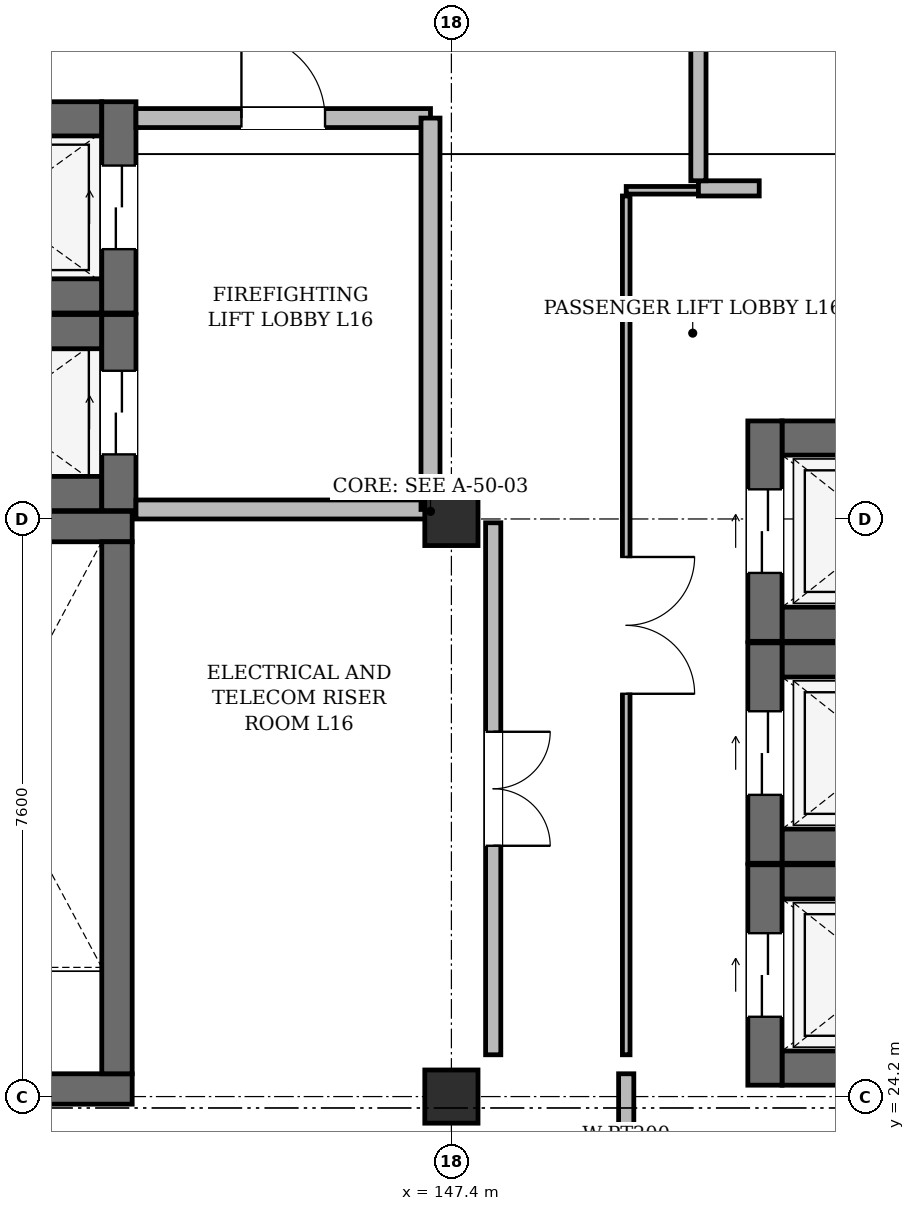
"""IFC4 building model, lengths in metres.
Left out: names, types, materials, properties, quantities, classifications, styles, units other than length and angle.
Written with IfcOpenShell. Run it as: python <this file> out.ifc"""

import sys

from ifc_helpers import new_model, si_unit, direction, frame, frame_2d, origin, origin_2d, place, context, subcontext, project, spatial, rectangle, extrude, element, fill, save


model = new_model("IFC4")
c1 = context("Model", 3, precision=1e-05, world=origin(), true_north=direction((0.0, 1.0)))
c2 = subcontext(c1, "Body", "Model", "MODEL_VIEW")
j1 = project(units=[si_unit("LENGTHUNIT", "METRE"), si_unit("PLANEANGLEUNIT", "RADIAN")], contexts=[c1])
p1 = place(None, origin())
s1 = spatial("IfcSite", under=j1, at=p1, CompositionType="ELEMENT")
p2 = place(p1, origin())
s2 = spatial("IfcBuilding", under=s1, at=p2, CompositionType="ELEMENT")
p3 = place(p2, frame((0.0, 0.0, 70.2)))
s3 = spatial("IfcBuildingStorey", under=s2, at=p3, CompositionType="ELEMENT", Elevation=70.2)
for number, where, z_axis, x_axis in (
    (1, (147.4, 24.2, 0.0), (0.0, 0.0, 1.0), (1.0, 0.0, 0.0)),
    (2, (147.4, 31.8, 0.0), (0.0, 0.0, 1.0), (1.0, 0.0, 0.0)),
):
    element("IfcColumn", number, at=place(p3, frame(where, z_axis=z_axis, x_axis=x_axis)), inside=s3, PredefinedType="COLUMN", context=c2, shape_type="SweptSolid", body=[
        extrude(rectangle(XDim=0.7, YDim=0.7, at=origin_2d()), origin(), (0.0, 0.0, 1.0), 3.67),
    ])
p4 = place(p3, frame((139.4, 24.3, 0.0), z_axis=(0.0, 0.0, 1.0), x_axis=(1.0, 0.0, 0.0)))
e3 = element("IfcWall", 3, at=p4, inside=s3, PredefinedType="SHEAR", context=c2, shape_type="SweptSolid", body=[
    extrude(rectangle(XDim=3.8, YDim=0.4, at=frame_2d((1.9, 0.0))), origin(), (0.0, 0.0, 1.0), 3.67),
])
p5 = place(p4, frame((1.3, 0.0, 0.0)))
e4 = element("IfcOpeningElement", 4, at=p5, cuts=e3, PredefinedType="OPENING", context=c2, shape_type="SweptSolid", body=[
    extrude(rectangle(XDim=1.2, YDim=2.2, at=frame_2d((0.6, 1.1))), frame((0.0, 0.212, 0.0), z_axis=(0.0, -1.0, 0.0), x_axis=(1.0, 0.0, 0.0)), (0.0, 0.0, 1.0), 0.424),
])
p6 = place(p3, frame((139.4, 31.7, 0.0), z_axis=(0.0, 0.0, 1.0), x_axis=(1.0, 0.0, 0.0)))
e5 = element("IfcWall", 5, at=p6, inside=s3, PredefinedType="SHEAR", context=c2, shape_type="SweptSolid", body=[
    extrude(rectangle(XDim=3.8, YDim=0.4, at=frame_2d((1.9, 0.0))), origin(), (0.0, 0.0, 1.0), 3.67),
])
p7 = place(p3, frame((143.0, 24.5, 0.0), z_axis=(0.0, 0.0, 1.0), x_axis=(0.0, 1.0, 0.0)))
e6 = element("IfcWall", 6, at=p7, inside=s3, PredefinedType="SHEAR", context=c2, shape_type="SweptSolid", body=[
    extrude(rectangle(XDim=7.0, YDim=0.4, at=frame_2d((3.5, 0.0))), origin(), (0.0, 0.0, 1.0), 3.67),
])
for number, where, z_axis, x_axis in (
    (7, (140.06, 32.135, 0.0), (0.0, 0.0, 1.0), (1.0, 0.0, 0.0)),
    (8, (140.06, 34.265, 0.0), (0.0, 0.0, 1.0), (1.0, 0.0, 0.0)),
):
    element("IfcWall", number, at=place(p3, frame(where, z_axis=z_axis, x_axis=x_axis)), inside=s3, PredefinedType="SHEAR", context=c2, shape_type="SweptSolid", body=[
        extrude(rectangle(XDim=2.74, YDim=0.45, at=frame_2d((1.37, 0.0))), origin(), (0.0, 0.0, 1.0), 3.67),
    ])
p8 = place(p3, frame((143.025, 31.91, 0.0), z_axis=(0.0, 0.0, 1.0), x_axis=(0.0, 1.0, 0.0)))
e9 = element("IfcWall", 9, at=p8, inside=s3, PredefinedType="SHEAR", context=c2, shape_type="SweptSolid", body=[
    extrude(rectangle(XDim=2.58, YDim=0.45, at=frame_2d((1.29, 0.0))), origin(), (0.0, 0.0, 1.0), 3.67),
])
p9 = place(p8, frame((0.74, 0.0, 0.0)))
e10 = element("IfcOpeningElement", 10, at=p9, cuts=e9, PredefinedType="OPENING", context=c2, shape_type="SweptSolid", body=[
    extrude(rectangle(XDim=1.1, YDim=2.2, at=frame_2d((0.55, 1.1))), frame((0.0, 0.237, 0.0), z_axis=(0.0, -1.0, 0.0), x_axis=(1.0, 0.0, 0.0)), (0.0, 0.0, 1.0), 0.474),
])
for number, where, z_axis, x_axis in (
    (11, (140.06, 34.735, 0.0), (0.0, 0.0, 1.0), (1.0, 0.0, 0.0)),
    (12, (140.06, 37.065, 0.0), (0.0, 0.0, 1.0), (1.0, 0.0, 0.0)),
):
    element("IfcWall", number, at=place(p3, frame(where, z_axis=z_axis, x_axis=x_axis)), inside=s3, PredefinedType="SHEAR", context=c2, shape_type="SweptSolid", body=[
        extrude(rectangle(XDim=2.74, YDim=0.45, at=frame_2d((1.37, 0.0))), origin(), (0.0, 0.0, 1.0), 3.67),
    ])
p10 = place(p3, frame((143.025, 34.51, 0.0), z_axis=(0.0, 0.0, 1.0), x_axis=(0.0, 1.0, 0.0)))
e13 = element("IfcWall", 13, at=p10, inside=s3, PredefinedType="SHEAR", context=c2, shape_type="SweptSolid", body=[
    extrude(rectangle(XDim=2.78, YDim=0.45, at=frame_2d((1.39, 0.0))), origin(), (0.0, 0.0, 1.0), 3.67),
])
p11 = place(p10, frame((0.84, 0.0, 0.0)))
e14 = element("IfcOpeningElement", 14, at=p11, cuts=e13, PredefinedType="OPENING", context=c2, shape_type="SweptSolid", body=[
    extrude(rectangle(XDim=1.1, YDim=2.2, at=frame_2d((0.55, 1.1))), frame((0.0, 0.237, 0.0), z_axis=(0.0, -1.0, 0.0), x_axis=(1.0, 0.0, 0.0)), (0.0, 0.0, 1.0), 0.474),
])
for number, where, z_axis, x_axis in (
    (15, (151.75, 24.575, 0.0), (0.0, 0.0, 1.0), (1.0, 0.0, 0.0)),
    (16, (151.75, 27.025, 0.0), (0.0, 0.0, 1.0), (1.0, 0.0, 0.0)),
):
    element("IfcWall", number, at=place(p3, frame(where, z_axis=z_axis, x_axis=x_axis)), inside=s3, PredefinedType="SHEAR", context=c2, shape_type="SweptSolid", body=[
        extrude(rectangle(XDim=2.7, YDim=0.45, at=frame_2d((1.35, 0.0))), origin(), (0.0, 0.0, 1.0), 3.67),
    ])
p12 = place(p3, frame((151.525, 24.35, 0.0), z_axis=(0.0, 0.0, 1.0), x_axis=(0.0, 1.0, 0.0)))
e17 = element("IfcWall", 17, at=p12, inside=s3, PredefinedType="SHEAR", context=c2, shape_type="SweptSolid", body=[
    extrude(rectangle(XDim=2.9, YDim=0.45, at=frame_2d((1.45, 0.0))), origin(), (0.0, 0.0, 1.0), 3.67),
])
p13 = place(p12, frame((0.9, 0.0, 0.0)))
e18 = element("IfcOpeningElement", 18, at=p13, cuts=e17, PredefinedType="OPENING", context=c2, shape_type="SweptSolid", body=[
    extrude(rectangle(XDim=1.1, YDim=2.2, at=frame_2d((0.55, 1.1))), frame((0.0, 0.237, 0.0), z_axis=(0.0, -1.0, 0.0), x_axis=(1.0, 0.0, 0.0)), (0.0, 0.0, 1.0), 0.474),
])
for number, where, z_axis, x_axis in (
    (19, (151.75, 27.495, 0.0), (0.0, 0.0, 1.0), (1.0, 0.0, 0.0)),
    (20, (151.75, 29.945, 0.0), (0.0, 0.0, 1.0), (1.0, 0.0, 0.0)),
):
    element("IfcWall", number, at=place(p3, frame(where, z_axis=z_axis, x_axis=x_axis)), inside=s3, PredefinedType="SHEAR", context=c2, shape_type="SweptSolid", body=[
        extrude(rectangle(XDim=2.7, YDim=0.45, at=frame_2d((1.35, 0.0))), origin(), (0.0, 0.0, 1.0), 3.67),
    ])
p14 = place(p3, frame((151.525, 27.27, 0.0), z_axis=(0.0, 0.0, 1.0), x_axis=(0.0, 1.0, 0.0)))
e21 = element("IfcWall", 21, at=p14, inside=s3, PredefinedType="SHEAR", context=c2, shape_type="SweptSolid", body=[
    extrude(rectangle(XDim=2.9, YDim=0.45, at=frame_2d((1.45, 0.0))), origin(), (0.0, 0.0, 1.0), 3.67),
])
p15 = place(p14, frame((0.9, 0.0, 0.0)))
e22 = element("IfcOpeningElement", 22, at=p15, cuts=e21, PredefinedType="OPENING", context=c2, shape_type="SweptSolid", body=[
    extrude(rectangle(XDim=1.1, YDim=2.2, at=frame_2d((0.55, 1.1))), frame((0.0, 0.237, 0.0), z_axis=(0.0, -1.0, 0.0), x_axis=(1.0, 0.0, 0.0)), (0.0, 0.0, 1.0), 0.474),
])
for number, where, z_axis, x_axis in (
    (23, (151.75, 30.415, 0.0), (0.0, 0.0, 1.0), (1.0, 0.0, 0.0)),
    (24, (151.75, 32.865, 0.0), (0.0, 0.0, 1.0), (1.0, 0.0, 0.0)),
):
    element("IfcWall", number, at=place(p3, frame(where, z_axis=z_axis, x_axis=x_axis)), inside=s3, PredefinedType="SHEAR", context=c2, shape_type="SweptSolid", body=[
        extrude(rectangle(XDim=2.7, YDim=0.45, at=frame_2d((1.35, 0.0))), origin(), (0.0, 0.0, 1.0), 3.67),
    ])
p16 = place(p3, frame((151.525, 30.19, 0.0), z_axis=(0.0, 0.0, 1.0), x_axis=(0.0, 1.0, 0.0)))
e25 = element("IfcWall", 25, at=p16, inside=s3, PredefinedType="SHEAR", context=c2, shape_type="SweptSolid", body=[
    extrude(rectangle(XDim=2.9, YDim=0.45, at=frame_2d((1.45, 0.0))), origin(), (0.0, 0.0, 1.0), 3.67),
])
p17 = place(p16, frame((0.9, 0.0, 0.0)))
e26 = element("IfcOpeningElement", 26, at=p17, cuts=e25, PredefinedType="OPENING", context=c2, shape_type="SweptSolid", body=[
    extrude(rectangle(XDim=1.1, YDim=2.2, at=frame_2d((0.55, 1.1))), frame((0.0, 0.237, 0.0), z_axis=(0.0, -1.0, 0.0), x_axis=(1.0, 0.0, 0.0)), (0.0, 0.0, 1.0), 0.474),
])
p18 = place(p3, frame((143.25, 37.075, 0.0), z_axis=(0.0, 0.0, 1.0), x_axis=(1.0, 0.0, 0.0)))
e27 = element("IfcWall", 27, at=p18, inside=s3, PredefinedType="SOLIDWALL", context=c2, shape_type="SweptSolid", body=[
    extrude(rectangle(XDim=3.875, YDim=0.25, at=frame_2d((1.938, 0.0))), origin(), (0.0, 0.0, 1.0), 3.605),
])
p19 = place(p18, frame((1.387, 0.0, 0.0)))
e28 = element("IfcOpeningElement", 28, at=p19, cuts=e27, PredefinedType="OPENING", context=c2, shape_type="SweptSolid", body=[
    extrude(rectangle(XDim=1.1, YDim=2.2, at=frame_2d((0.55, 1.1))), frame((0.0, 0.137, 0.0), z_axis=(0.0, -1.0, 0.0), x_axis=(1.0, 0.0, 0.0)), (0.0, 0.0, 1.0), 0.274),
])
p20 = place(p3, frame((143.25, 31.925, 0.0), z_axis=(0.0, 0.0, 1.0), x_axis=(1.0, 0.0, 0.0)))
e29 = element("IfcWall", 29, at=p20, inside=s3, PredefinedType="SOLIDWALL", context=c2, shape_type="SweptSolid", body=[
    extrude(rectangle(XDim=3.875, YDim=0.25, at=frame_2d((1.938, 0.0))), origin(), (0.0, 0.0, 1.0), 3.005),
])
p21 = place(p3, frame((147.125, 31.925, 0.0), z_axis=(0.0, 0.0, 1.0), x_axis=(0.0, 1.0, 0.0)))
e30 = element("IfcWall", 30, at=p21, inside=s3, PredefinedType="SOLIDWALL", context=c2, shape_type="SweptSolid", body=[
    extrude(rectangle(XDim=5.15, YDim=0.25, at=frame_2d((2.575, 0.0))), origin(), (0.0, 0.0, 1.0), 3.005),
])
p22 = place(p3, frame((147.95, 31.75, 0.0), z_axis=(0.0, 0.0, 1.0), x_axis=(0.0, -1.0, 0.0)))
e31 = element("IfcWall", 31, at=p22, inside=s3, PredefinedType="PARTITIONING", context=c2, shape_type="SweptSolid", body=[
    extrude(rectangle(XDim=7.0, YDim=0.2, at=frame_2d((3.5, 0.0))), origin(), (0.0, 0.0, 1.0), 3.605),
])
p23 = place(p22, frame((2.75, 0.0, 0.0)))
e32 = element("IfcOpeningElement", 32, at=p23, cuts=e31, PredefinedType="OPENING", context=c2, shape_type="SweptSolid", body=[
    extrude(rectangle(XDim=1.5, YDim=2.2, at=frame_2d((0.75, 1.1))), frame((0.0, 0.112, 0.0), z_axis=(0.0, -1.0, 0.0), x_axis=(1.0, 0.0, 0.0)), (0.0, 0.0, 1.0), 0.224),
])
p24 = place(p3, frame((149.7, 24.75, 0.0), z_axis=(0.0, 0.0, 1.0), x_axis=(0.0, 1.0, 0.0)))
e33 = element("IfcWall", 33, at=p24, inside=s3, PredefinedType="PARTITIONING", context=c2, shape_type="SweptSolid", body=[
    extrude(rectangle(XDim=11.3, YDim=0.1, at=frame_2d((5.65, 0.0))), origin(), (0.0, 0.0, 1.0), 3.605),
])
p25 = place(p24, frame((4.75, 0.0, 0.0)))
e34 = element("IfcOpeningElement", 34, at=p25, cuts=e33, PredefinedType="OPENING", context=c2, shape_type="SweptSolid", body=[
    extrude(rectangle(XDim=1.8, YDim=2.4, at=frame_2d((0.9, 1.2))), frame((0.0, 0.062, 0.0), z_axis=(0.0, -1.0, 0.0), x_axis=(1.0, 0.0, 0.0)), (0.0, 0.0, 1.0), 0.124),
])
p26 = place(p3, frame((149.7, 36.125, 0.0), z_axis=(0.0, 0.0, 1.0), x_axis=(1.0, 0.0, 0.0)))
e35 = element("IfcWall", 35, at=p26, inside=s3, PredefinedType="PARTITIONING", context=c2, shape_type="SweptSolid", body=[
    extrude(rectangle(XDim=0.95, YDim=0.1, at=frame_2d((0.475, 0.0))), origin(), (0.0, 0.0, 1.0), 3.605),
])
for number, where, z_axis, x_axis in (
    (36, (150.65, 36.15, 0.0), (0.0, 0.0, 1.0), (1.0, 0.0, 0.0)),
    (37, (149.7, 24.5, 0.0), (0.0, 0.0, 1.0), (0.0, -1.0, 0.0)),
):
    element("IfcWall", number, at=place(p3, frame(where, z_axis=z_axis, x_axis=x_axis)), inside=s3, PredefinedType="PARTITIONING", context=c2, shape_type="SweptSolid", body=[
        extrude(rectangle(XDim=0.8, YDim=0.2, at=frame_2d((0.4, 0.0))), origin(), (0.0, 0.0, 1.0), 3.605),
    ])
p27 = place(p3, frame((150.65, 47.0, 0.0), z_axis=(0.0, 0.0, 1.0), x_axis=(0.0, -1.0, 0.0)))
e38 = element("IfcWall", 38, at=p27, inside=s3, PredefinedType="PARTITIONING", context=c2, shape_type="SweptSolid", body=[
    extrude(rectangle(XDim=10.75, YDim=0.2, at=frame_2d((5.375, 0.0))), origin(), (0.0, 0.0, 1.0), 3.605),
])
p28 = place(p27, frame((4.625, 0.0, 0.0)))
e39 = element("IfcOpeningElement", 39, at=p28, cuts=e38, PredefinedType="OPENING", context=c2, shape_type="SweptSolid", body=[
    extrude(rectangle(XDim=1.5, YDim=2.2, at=frame_2d((0.75, 1.1))), frame((0.0, 0.112, 0.0), z_axis=(0.0, -1.0, 0.0), x_axis=(1.0, 0.0, 0.0)), (0.0, 0.0, 1.0), 0.224),
])
p29 = place(p9, origin())
e40 = element("IfcDoor", 40, at=p29, inside=s3, OperationType="DOUBLE_DOOR_SLIDING", PredefinedType="DOOR", context=c2, shape_type="SweptSolid", body=[
    extrude(rectangle(XDim=1.1, YDim=2.2, at=frame_2d((0.55, 1.1))), frame((0.0, 0.025, 0.0), z_axis=(0.0, -1.0, 0.0), x_axis=(1.0, 0.0, 0.0)), (0.0, 0.0, 1.0), 0.05),
])
fill(e10, e40)
p30 = place(p11, origin())
e41 = element("IfcDoor", 41, at=p30, inside=s3, OperationType="DOUBLE_DOOR_SLIDING", PredefinedType="DOOR", context=c2, shape_type="SweptSolid", body=[
    extrude(rectangle(XDim=1.1, YDim=2.2, at=frame_2d((0.55, 1.1))), frame((0.0, 0.025, 0.0), z_axis=(0.0, -1.0, 0.0), x_axis=(1.0, 0.0, 0.0)), (0.0, 0.0, 1.0), 0.05),
])
fill(e14, e41)
p31 = place(p13, origin())
e42 = element("IfcDoor", 42, at=p31, inside=s3, OperationType="DOUBLE_DOOR_SLIDING", PredefinedType="DOOR", context=c2, shape_type="SweptSolid", body=[
    extrude(rectangle(XDim=1.1, YDim=2.2, at=frame_2d((0.55, 1.1))), frame((0.0, 0.025, 0.0), z_axis=(0.0, -1.0, 0.0), x_axis=(1.0, 0.0, 0.0)), (0.0, 0.0, 1.0), 0.05),
])
fill(e18, e42)
p32 = place(p15, origin())
e43 = element("IfcDoor", 43, at=p32, inside=s3, OperationType="DOUBLE_DOOR_SLIDING", PredefinedType="DOOR", context=c2, shape_type="SweptSolid", body=[
    extrude(rectangle(XDim=1.1, YDim=2.2, at=frame_2d((0.55, 1.1))), frame((0.0, 0.025, 0.0), z_axis=(0.0, -1.0, 0.0), x_axis=(1.0, 0.0, 0.0)), (0.0, 0.0, 1.0), 0.05),
])
fill(e22, e43)
p33 = place(p17, origin())
e44 = element("IfcDoor", 44, at=p33, inside=s3, OperationType="DOUBLE_DOOR_SLIDING", PredefinedType="DOOR", context=c2, shape_type="SweptSolid", body=[
    extrude(rectangle(XDim=1.1, YDim=2.2, at=frame_2d((0.55, 1.1))), frame((0.0, 0.025, 0.0), z_axis=(0.0, -1.0, 0.0), x_axis=(1.0, 0.0, 0.0)), (0.0, 0.0, 1.0), 0.05),
])
fill(e26, e44)
p34 = place(p19, origin())
e45 = element("IfcDoor", 45, at=p34, inside=s3, OperationType="SINGLE_SWING_LEFT", PredefinedType="DOOR", context=c2, shape_type="SweptSolid", body=[
    extrude(rectangle(XDim=1.1, YDim=2.2, at=frame_2d((0.55, 1.1))), frame((0.0, 0.025, 0.0), z_axis=(0.0, -1.0, 0.0), x_axis=(1.0, 0.0, 0.0)), (0.0, 0.0, 1.0), 0.05),
])
fill(e28, e45)
p35 = place(p23, origin())
e46 = element("IfcDoor", 46, at=p35, inside=s3, OperationType="DOUBLE_DOOR_SINGLE_SWING", PredefinedType="DOOR", context=c2, shape_type="SweptSolid", body=[
    extrude(rectangle(XDim=1.5, YDim=2.2, at=frame_2d((0.75, 1.1))), frame((0.0, 0.025, 0.0), z_axis=(0.0, -1.0, 0.0), x_axis=(1.0, 0.0, 0.0)), (0.0, 0.0, 1.0), 0.05),
])
fill(e32, e46)
p36 = place(p25, frame((1.8, 0.0, 0.0), z_axis=(0.0, 0.0, 1.0), x_axis=(-1.0, 0.0, 0.0)))
e47 = element("IfcDoor", 47, at=p36, inside=s3, OperationType="DOUBLE_DOOR_SINGLE_SWING", PredefinedType="DOOR", context=c2, shape_type="SweptSolid", body=[
    extrude(rectangle(XDim=1.8, YDim=2.4, at=frame_2d((0.9, 1.2))), frame((0.0, 0.025, 0.0), z_axis=(0.0, -1.0, 0.0), x_axis=(1.0, 0.0, 0.0)), (0.0, 0.0, 1.0), 0.05),
])
fill(e34, e47)
save(model, sys.argv[1])
